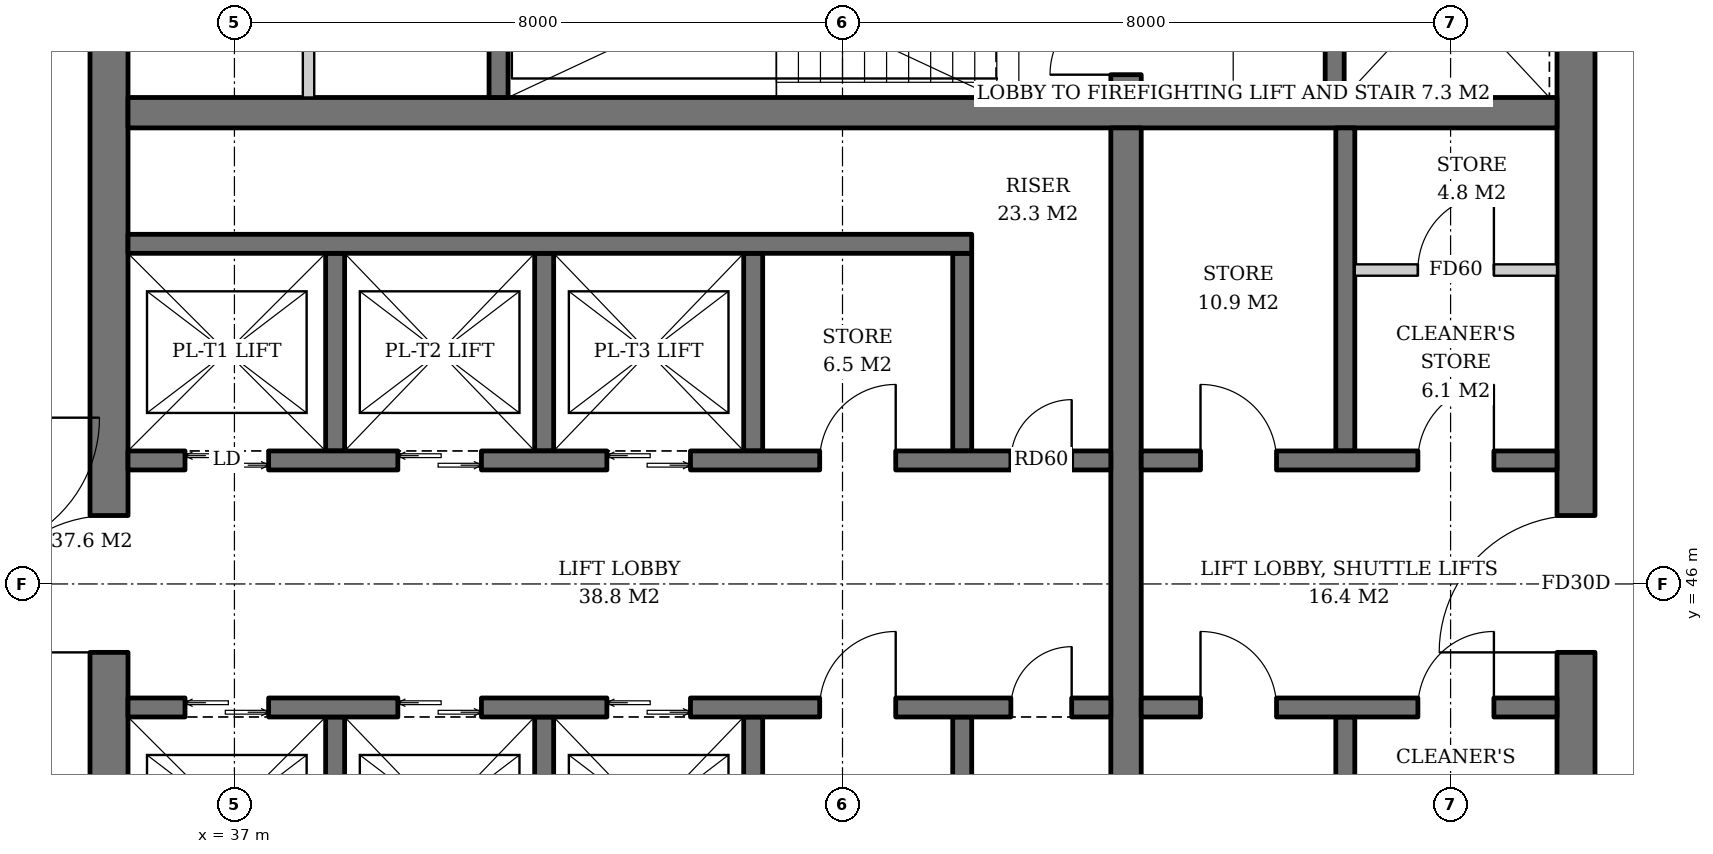
"""IFC4 building model, lengths in metres.
Left out: names, types, materials, properties, quantities, classifications, styles, units other than length and angle.
Written with IfcOpenShell. Run it as: python <this file> out.ifc"""

import sys

from ifc_helpers import new_model, si_unit, direction, frame, frame_2d, origin, place, context, subcontext, project, spatial, rectangle, extrude, element, fill, save


model = new_model("IFC4")
c1 = context("Model", 3, precision=1e-05, world=origin(), true_north=direction((0.0, 1.0)))
c2 = subcontext(c1, "Body", "Model", "MODEL_VIEW")
j1 = project(units=[si_unit("LENGTHUNIT", "METRE"), si_unit("PLANEANGLEUNIT", "RADIAN")], contexts=[c1])
p1 = place(None, origin())
s1 = spatial("IfcSite", under=j1, at=p1, CompositionType="ELEMENT")
p2 = place(p1, origin())
s2 = spatial("IfcBuilding", under=s1, at=p2, CompositionType="ELEMENT")
p3 = place(p2, frame((0.0, 0.0, 287.0)))
s3 = spatial("IfcBuildingStorey", under=s2, at=p3, CompositionType="ELEMENT", Elevation=287.0)
p4 = place(p3, frame((35.35, 36.6, 0.0), z_axis=(0.0, 0.0, 1.0), x_axis=(0.0, 1.0, 0.0)))
e1 = element("IfcWall", 1, at=p4, inside=s3, PredefinedType="SHEAR", context=c2, shape_type="SweptSolid", body=[
    extrude(rectangle(XDim=18.8, YDim=0.5, at=frame_2d((9.4, 0.0))), origin(), (0.0, 0.0, 1.0), 3.8),
])
p5 = place(p4, frame((8.5, 0.0, 0.0)))
e2 = element("IfcOpeningElement", 2, at=p5, cuts=e1, PredefinedType="OPENING", context=c2, shape_type="SweptSolid", body=[
    extrude(rectangle(XDim=1.8, YDim=2.4, at=frame_2d((0.9, 1.2))), frame((0.0, 0.26, 0.0), z_axis=(0.0, -1.0, 0.0), x_axis=(1.0, 0.0, 0.0)), (0.0, 0.0, 1.0), 0.52),
])
p6 = place(p3, frame((54.65, 36.6, 0.0), z_axis=(0.0, 0.0, 1.0), x_axis=(0.0, 1.0, 0.0)))
e3 = element("IfcWall", 3, at=p6, inside=s3, PredefinedType="SHEAR", context=c2, shape_type="SweptSolid", body=[
    extrude(rectangle(XDim=18.8, YDim=0.5, at=frame_2d((9.4, 0.0))), origin(), (0.0, 0.0, 1.0), 3.8),
])
p7 = place(p6, frame((8.5, 0.0, 0.0)))
e4 = element("IfcOpeningElement", 4, at=p7, cuts=e3, PredefinedType="OPENING", context=c2, shape_type="SweptSolid", body=[
    extrude(rectangle(XDim=1.8, YDim=2.4, at=frame_2d((0.9, 1.2))), frame((0.0, 0.26, 0.0), z_axis=(0.0, -1.0, 0.0), x_axis=(1.0, 0.0, 0.0)), (0.0, 0.0, 1.0), 0.52),
])
p8 = place(p3, frame((35.6, 52.2, 0.0), z_axis=(0.0, 0.0, 1.0), x_axis=(1.0, 0.0, 0.0)))
e5 = element("IfcWall", 5, at=p8, inside=s3, PredefinedType="SHEAR", context=c2, shape_type="SweptSolid", body=[
    extrude(rectangle(XDim=18.8, YDim=0.4, at=frame_2d((9.4, 0.0))), origin(), (0.0, 0.0, 1.0), 3.8),
])
p9 = place(p3, frame((48.73, 40.0, 0.0), z_axis=(0.0, 0.0, 1.0), x_axis=(0.0, 1.0, 0.0)))
e6 = element("IfcWall", 6, at=p9, inside=s3, PredefinedType="SHEAR", context=c2, shape_type="SweptSolid", body=[
    extrude(rectangle(XDim=12.0, YDim=0.4, at=frame_2d((6.0, 0.0))), origin(), (0.0, 0.0, 1.0), 3.8),
])
p10 = place(p3, frame((48.73, 52.4, 0.0), z_axis=(0.0, 0.0, 1.0), x_axis=(0.0, 1.0, 0.0)))
e7 = element("IfcWall", 7, at=p10, inside=s3, PredefinedType="SHEAR", context=c2, shape_type="SweptSolid", body=[
    extrude(rectangle(XDim=3.0, YDim=0.4, at=frame_2d((1.5, 0.0))), origin(), (0.0, 0.0, 1.0), 3.8),
])
p11 = place(p10, frame((0.3, 0.0, 0.0)))
e8 = element("IfcOpeningElement", 8, at=p11, cuts=e7, PredefinedType="OPENING", context=c2, shape_type="SweptSolid", body=[
    extrude(rectangle(XDim=1.0, YDim=2.1, at=frame_2d((0.5, 1.05))), frame((0.0, 0.21, 0.0), z_axis=(0.0, -1.0, 0.0), x_axis=(1.0, 0.0, 0.0)), (0.0, 0.0, 1.0), 0.42),
])
p12 = place(p3, frame((40.475, 52.4, 0.0), z_axis=(0.0, 0.0, 1.0), x_axis=(0.0, 1.0, 0.0)))
e9 = element("IfcWall", 9, at=p12, inside=s3, PredefinedType="SHEAR", context=c2, shape_type="SweptSolid", body=[
    extrude(rectangle(XDim=3.0, YDim=0.25, at=frame_2d((1.5, 0.0))), origin(), (0.0, 0.0, 1.0), 3.8),
])
p13 = place(p3, frame((51.475, 52.4, 0.0), z_axis=(0.0, 0.0, 1.0), x_axis=(0.0, 1.0, 0.0)))
e10 = element("IfcWall", 10, at=p13, inside=s3, PredefinedType="SHEAR", context=c2, shape_type="SweptSolid", body=[
    extrude(rectangle(XDim=3.0, YDim=0.25, at=frame_2d((1.5, 0.0))), origin(), (0.0, 0.0, 1.0), 3.8),
])
p14 = place(p13, frame((0.8, 0.0, 0.0)))
e11 = element("IfcOpeningElement", 11, at=p14, cuts=e10, PredefinedType="OPENING", context=c2, shape_type="SweptSolid", body=[
    extrude(rectangle(XDim=1.3, YDim=2.2, at=frame_2d((0.65, 1.1))), frame((0.0, 0.135, 0.0), z_axis=(0.0, -1.0, 0.0), x_axis=(1.0, 0.0, 0.0)), (0.0, 0.0, 1.0), 0.27),
])
for number, where, z_axis, x_axis in (
    (12, (38.325, 47.75, 0.0), (0.0, 0.0, 1.0), (0.0, 1.0, 0.0)),
    (13, (41.075, 47.75, 0.0), (0.0, 0.0, 1.0), (0.0, 1.0, 0.0)),
    (14, (43.825, 47.75, 0.0), (0.0, 0.0, 1.0), (0.0, 1.0, 0.0)),
    (15, (46.575, 47.75, 0.0), (0.0, 0.0, 1.0), (0.0, 1.0, 0.0)),
):
    element("IfcWall", number, at=place(p3, frame(where, z_axis=z_axis, x_axis=x_axis)), inside=s3, PredefinedType="SHEAR", context=c2, shape_type="SweptSolid", body=[
        extrude(rectangle(XDim=2.6, YDim=0.25, at=frame_2d((1.3, 0.0))), origin(), (0.0, 0.0, 1.0), 3.8),
    ])
p15 = place(p3, frame((35.6, 50.475, 0.0), z_axis=(0.0, 0.0, 1.0), x_axis=(1.0, 0.0, 0.0)))
e16 = element("IfcWall", 16, at=p15, inside=s3, PredefinedType="SHEAR", context=c2, shape_type="SweptSolid", body=[
    extrude(rectangle(XDim=11.1, YDim=0.25, at=frame_2d((5.55, 0.0))), origin(), (0.0, 0.0, 1.0), 3.8),
])
p16 = place(p3, frame((35.6, 47.625, 0.0), z_axis=(0.0, 0.0, 1.0), x_axis=(1.0, 0.0, 0.0)))
e17 = element("IfcWall", 17, at=p16, inside=s3, PredefinedType="SHEAR", context=c2, shape_type="SweptSolid", body=[
    extrude(rectangle(XDim=12.93, YDim=0.25, at=frame_2d((6.465, 0.0))), origin(), (0.0, 0.0, 1.0), 3.8),
])
p17 = place(p16, frame((0.75, 0.0, 0.0)))
e18 = element("IfcOpeningElement", 18, at=p17, cuts=e17, PredefinedType="OPENING", context=c2, shape_type="SweptSolid", body=[
    extrude(rectangle(XDim=1.1, YDim=2.2, at=frame_2d((0.55, 1.1))), frame((0.0, 0.135, 0.0), z_axis=(0.0, -1.0, 0.0), x_axis=(1.0, 0.0, 0.0)), (0.0, 0.0, 1.0), 0.27),
])
p18 = place(p16, frame((3.55, 0.0, 0.0)))
e19 = element("IfcOpeningElement", 19, at=p18, cuts=e17, PredefinedType="OPENING", context=c2, shape_type="SweptSolid", body=[
    extrude(rectangle(XDim=1.1, YDim=2.2, at=frame_2d((0.55, 1.1))), frame((0.0, 0.135, 0.0), z_axis=(0.0, -1.0, 0.0), x_axis=(1.0, 0.0, 0.0)), (0.0, 0.0, 1.0), 0.27),
])
p19 = place(p16, frame((6.3, 0.0, 0.0)))
e20 = element("IfcOpeningElement", 20, at=p19, cuts=e17, PredefinedType="OPENING", context=c2, shape_type="SweptSolid", body=[
    extrude(rectangle(XDim=1.1, YDim=2.2, at=frame_2d((0.55, 1.1))), frame((0.0, 0.135, 0.0), z_axis=(0.0, -1.0, 0.0), x_axis=(1.0, 0.0, 0.0)), (0.0, 0.0, 1.0), 0.27),
])
p20 = place(p16, frame((9.1, 0.0, 0.0)))
e21 = element("IfcOpeningElement", 21, at=p20, cuts=e17, PredefinedType="OPENING", context=c2, shape_type="SweptSolid", body=[
    extrude(rectangle(XDim=1.0, YDim=2.1, at=frame_2d((0.5, 1.05))), frame((0.0, 0.135, 0.0), z_axis=(0.0, -1.0, 0.0), x_axis=(1.0, 0.0, 0.0)), (0.0, 0.0, 1.0), 0.27),
])
p21 = place(p16, frame((11.615, 0.0, 0.0)))
e22 = element("IfcOpeningElement", 22, at=p21, cuts=e17, PredefinedType="OPENING", context=c2, shape_type="SweptSolid", body=[
    extrude(rectangle(XDim=0.8, YDim=2.0, at=frame_2d((0.4, 1.0))), frame((0.0, 0.135, 0.0), z_axis=(0.0, -1.0, 0.0), x_axis=(1.0, 0.0, 0.0)), (0.0, 0.0, 1.0), 0.27),
])
for number, where, z_axis, x_axis in (
    (23, (38.325, 44.25, 0.0), (0.0, 0.0, 1.0), (0.0, -1.0, 0.0)),
    (24, (41.075, 44.25, 0.0), (0.0, 0.0, 1.0), (0.0, -1.0, 0.0)),
    (25, (43.825, 44.25, 0.0), (0.0, 0.0, 1.0), (0.0, -1.0, 0.0)),
    (26, (46.575, 44.25, 0.0), (0.0, 0.0, 1.0), (0.0, -1.0, 0.0)),
):
    element("IfcWall", number, at=place(p3, frame(where, z_axis=z_axis, x_axis=x_axis)), inside=s3, PredefinedType="SHEAR", context=c2, shape_type="SweptSolid", body=[
        extrude(rectangle(XDim=2.6, YDim=0.25, at=frame_2d((1.3, 0.0))), origin(), (0.0, 0.0, 1.0), 3.8),
    ])
p22 = place(p3, frame((35.6, 44.375, 0.0), z_axis=(0.0, 0.0, 1.0), x_axis=(1.0, 0.0, 0.0)))
e27 = element("IfcWall", 27, at=p22, inside=s3, PredefinedType="SHEAR", context=c2, shape_type="SweptSolid", body=[
    extrude(rectangle(XDim=12.93, YDim=0.25, at=frame_2d((6.465, 0.0))), origin(), (0.0, 0.0, 1.0), 3.8),
])
p23 = place(p22, frame((0.75, 0.0, 0.0)))
e28 = element("IfcOpeningElement", 28, at=p23, cuts=e27, PredefinedType="OPENING", context=c2, shape_type="SweptSolid", body=[
    extrude(rectangle(XDim=1.1, YDim=2.2, at=frame_2d((0.55, 1.1))), frame((0.0, 0.135, 0.0), z_axis=(0.0, -1.0, 0.0), x_axis=(1.0, 0.0, 0.0)), (0.0, 0.0, 1.0), 0.27),
])
p24 = place(p22, frame((3.55, 0.0, 0.0)))
e29 = element("IfcOpeningElement", 29, at=p24, cuts=e27, PredefinedType="OPENING", context=c2, shape_type="SweptSolid", body=[
    extrude(rectangle(XDim=1.1, YDim=2.2, at=frame_2d((0.55, 1.1))), frame((0.0, 0.135, 0.0), z_axis=(0.0, -1.0, 0.0), x_axis=(1.0, 0.0, 0.0)), (0.0, 0.0, 1.0), 0.27),
])
p25 = place(p22, frame((6.3, 0.0, 0.0)))
e30 = element("IfcOpeningElement", 30, at=p25, cuts=e27, PredefinedType="OPENING", context=c2, shape_type="SweptSolid", body=[
    extrude(rectangle(XDim=1.1, YDim=2.2, at=frame_2d((0.55, 1.1))), frame((0.0, 0.135, 0.0), z_axis=(0.0, -1.0, 0.0), x_axis=(1.0, 0.0, 0.0)), (0.0, 0.0, 1.0), 0.27),
])
p26 = place(p22, frame((9.1, 0.0, 0.0)))
e31 = element("IfcOpeningElement", 31, at=p26, cuts=e27, PredefinedType="OPENING", context=c2, shape_type="SweptSolid", body=[
    extrude(rectangle(XDim=1.0, YDim=2.1, at=frame_2d((0.5, 1.05))), frame((0.0, 0.135, 0.0), z_axis=(0.0, -1.0, 0.0), x_axis=(1.0, 0.0, 0.0)), (0.0, 0.0, 1.0), 0.27),
])
p27 = place(p22, frame((11.615, 0.0, 0.0)))
e32 = element("IfcOpeningElement", 32, at=p27, cuts=e27, PredefinedType="OPENING", context=c2, shape_type="SweptSolid", body=[
    extrude(rectangle(XDim=0.8, YDim=2.0, at=frame_2d((0.4, 1.0))), frame((0.0, 0.135, 0.0), z_axis=(0.0, -1.0, 0.0), x_axis=(1.0, 0.0, 0.0)), (0.0, 0.0, 1.0), 0.27),
])
p28 = place(p3, frame((51.615, 47.75, 0.0), z_axis=(0.0, 0.0, 1.0), x_axis=(0.0, 1.0, 0.0)))
e33 = element("IfcWall", 33, at=p28, inside=s3, PredefinedType="SHEAR", context=c2, shape_type="SweptSolid", body=[
    extrude(rectangle(XDim=4.25, YDim=0.25, at=frame_2d((2.125, 0.0))), origin(), (0.0, 0.0, 1.0), 3.8),
])
p29 = place(p3, frame((48.93, 47.625, 0.0), z_axis=(0.0, 0.0, 1.0), x_axis=(1.0, 0.0, 0.0)))
e34 = element("IfcWall", 34, at=p29, inside=s3, PredefinedType="SHEAR", context=c2, shape_type="SweptSolid", body=[
    extrude(rectangle(XDim=5.47, YDim=0.25, at=frame_2d((2.735, 0.0))), origin(), (0.0, 0.0, 1.0), 3.8),
])
p30 = place(p29, frame((0.78, 0.0, 0.0)))
e35 = element("IfcOpeningElement", 35, at=p30, cuts=e34, PredefinedType="OPENING", context=c2, shape_type="SweptSolid", body=[
    extrude(rectangle(XDim=1.0, YDim=2.1, at=frame_2d((0.5, 1.05))), frame((0.0, 0.135, 0.0), z_axis=(0.0, -1.0, 0.0), x_axis=(1.0, 0.0, 0.0)), (0.0, 0.0, 1.0), 0.27),
])
p31 = place(p29, frame((3.64, 0.0, 0.0)))
e36 = element("IfcOpeningElement", 36, at=p31, cuts=e34, PredefinedType="OPENING", context=c2, shape_type="SweptSolid", body=[
    extrude(rectangle(XDim=1.0, YDim=2.1, at=frame_2d((0.5, 1.05))), frame((0.0, 0.135, 0.0), z_axis=(0.0, -1.0, 0.0), x_axis=(1.0, 0.0, 0.0)), (0.0, 0.0, 1.0), 0.27),
])
p32 = place(p3, frame((51.615, 44.25, 0.0), z_axis=(0.0, 0.0, 1.0), x_axis=(0.0, -1.0, 0.0)))
e37 = element("IfcWall", 37, at=p32, inside=s3, PredefinedType="SHEAR", context=c2, shape_type="SweptSolid", body=[
    extrude(rectangle(XDim=4.25, YDim=0.25, at=frame_2d((2.125, 0.0))), origin(), (0.0, 0.0, 1.0), 3.8),
])
p33 = place(p3, frame((48.93, 44.375, 0.0), z_axis=(0.0, 0.0, 1.0), x_axis=(1.0, 0.0, 0.0)))
e38 = element("IfcWall", 38, at=p33, inside=s3, PredefinedType="SHEAR", context=c2, shape_type="SweptSolid", body=[
    extrude(rectangle(XDim=5.47, YDim=0.25, at=frame_2d((2.735, 0.0))), origin(), (0.0, 0.0, 1.0), 3.8),
])
p34 = place(p33, frame((0.78, 0.0, 0.0)))
e39 = element("IfcOpeningElement", 39, at=p34, cuts=e38, PredefinedType="OPENING", context=c2, shape_type="SweptSolid", body=[
    extrude(rectangle(XDim=1.0, YDim=2.1, at=frame_2d((0.5, 1.05))), frame((0.0, 0.135, 0.0), z_axis=(0.0, -1.0, 0.0), x_axis=(1.0, 0.0, 0.0)), (0.0, 0.0, 1.0), 0.27),
])
p35 = place(p33, frame((3.64, 0.0, 0.0)))
e40 = element("IfcOpeningElement", 40, at=p35, cuts=e38, PredefinedType="OPENING", context=c2, shape_type="SweptSolid", body=[
    extrude(rectangle(XDim=1.0, YDim=2.1, at=frame_2d((0.5, 1.05))), frame((0.0, 0.135, 0.0), z_axis=(0.0, -1.0, 0.0), x_axis=(1.0, 0.0, 0.0)), (0.0, 0.0, 1.0), 0.27),
])
p36 = place(p3, frame((37.975, 52.4, 0.0), z_axis=(0.0, 0.0, 1.0), x_axis=(0.0, 1.0, 0.0)))
e41 = element("IfcWall", 41, at=p36, inside=s3, PredefinedType="SOLIDWALL", context=c2, shape_type="SweptSolid", body=[
    extrude(rectangle(XDim=3.0, YDim=0.15, at=frame_2d((1.5, 0.0))), origin(), (0.0, 0.0, 1.0), 3.55),
])
p37 = place(p3, frame((51.74, 50.13, 0.0), z_axis=(0.0, 0.0, 1.0), x_axis=(1.0, 0.0, 0.0)))
e42 = element("IfcWall", 42, at=p37, inside=s3, PredefinedType="SOLIDWALL", context=c2, shape_type="SweptSolid", body=[
    extrude(rectangle(XDim=2.66, YDim=0.15, at=frame_2d((1.33, 0.0))), origin(), (0.0, 0.0, 1.0), 3.55),
])
p38 = place(p37, frame((0.83, 0.0, 0.0)))
e43 = element("IfcOpeningElement", 43, at=p38, cuts=e42, PredefinedType="OPENING", context=c2, shape_type="SweptSolid", body=[
    extrude(rectangle(XDim=1.0, YDim=2.1, at=frame_2d((0.5, 1.05))), frame((0.0, 0.085, 0.0), z_axis=(0.0, -1.0, 0.0), x_axis=(1.0, 0.0, 0.0)), (0.0, 0.0, 1.0), 0.17),
])
p39 = place(p17, origin())
e44 = element("IfcDoor", 44, at=p39, inside=s3, OperationType="DOUBLE_DOOR_SLIDING", PredefinedType="DOOR", context=c2, shape_type="SweptSolid", body=[
    extrude(rectangle(XDim=1.1, YDim=2.2, at=frame_2d((0.55, 1.1))), frame((0.0, 0.025, 0.0), z_axis=(0.0, -1.0, 0.0), x_axis=(1.0, 0.0, 0.0)), (0.0, 0.0, 1.0), 0.05),
])
fill(e18, e44)
p40 = place(p18, origin())
e45 = element("IfcDoor", 45, at=p40, inside=s3, OperationType="DOUBLE_DOOR_SLIDING", PredefinedType="DOOR", context=c2, shape_type="SweptSolid", body=[
    extrude(rectangle(XDim=1.1, YDim=2.2, at=frame_2d((0.55, 1.1))), frame((0.0, 0.025, 0.0), z_axis=(0.0, -1.0, 0.0), x_axis=(1.0, 0.0, 0.0)), (0.0, 0.0, 1.0), 0.05),
])
fill(e19, e45)
p41 = place(p19, origin())
e46 = element("IfcDoor", 46, at=p41, inside=s3, OperationType="DOUBLE_DOOR_SLIDING", PredefinedType="DOOR", context=c2, shape_type="SweptSolid", body=[
    extrude(rectangle(XDim=1.1, YDim=2.2, at=frame_2d((0.55, 1.1))), frame((0.0, 0.025, 0.0), z_axis=(0.0, -1.0, 0.0), x_axis=(1.0, 0.0, 0.0)), (0.0, 0.0, 1.0), 0.05),
])
fill(e20, e46)
p42 = place(p20, origin())
e47 = element("IfcDoor", 47, at=p42, inside=s3, OperationType="SINGLE_SWING_RIGHT", PredefinedType="DOOR", context=c2, shape_type="SweptSolid", body=[
    extrude(rectangle(XDim=1.0, YDim=2.1, at=frame_2d((0.5, 1.05))), frame((0.0, 0.025, 0.0), z_axis=(0.0, -1.0, 0.0), x_axis=(1.0, 0.0, 0.0)), (0.0, 0.0, 1.0), 0.05),
])
fill(e21, e47)
p43 = place(p21, origin())
e48 = element("IfcDoor", 48, at=p43, inside=s3, OperationType="SINGLE_SWING_RIGHT", PredefinedType="DOOR", context=c2, shape_type="SweptSolid", body=[
    extrude(rectangle(XDim=0.8, YDim=2.0, at=frame_2d((0.4, 1.0))), frame((0.0, 0.025, 0.0), z_axis=(0.0, -1.0, 0.0), x_axis=(1.0, 0.0, 0.0)), (0.0, 0.0, 1.0), 0.05),
])
fill(e22, e48)
p44 = place(p23, origin())
e49 = element("IfcDoor", 49, at=p44, inside=s3, OperationType="DOUBLE_DOOR_SLIDING", PredefinedType="DOOR", context=c2, shape_type="SweptSolid", body=[
    extrude(rectangle(XDim=1.1, YDim=2.2, at=frame_2d((0.55, 1.1))), frame((0.0, 0.025, 0.0), z_axis=(0.0, -1.0, 0.0), x_axis=(1.0, 0.0, 0.0)), (0.0, 0.0, 1.0), 0.05),
])
fill(e28, e49)
p45 = place(p24, origin())
e50 = element("IfcDoor", 50, at=p45, inside=s3, OperationType="DOUBLE_DOOR_SLIDING", PredefinedType="DOOR", context=c2, shape_type="SweptSolid", body=[
    extrude(rectangle(XDim=1.1, YDim=2.2, at=frame_2d((0.55, 1.1))), frame((0.0, 0.025, 0.0), z_axis=(0.0, -1.0, 0.0), x_axis=(1.0, 0.0, 0.0)), (0.0, 0.0, 1.0), 0.05),
])
fill(e29, e50)
p46 = place(p25, origin())
e51 = element("IfcDoor", 51, at=p46, inside=s3, OperationType="DOUBLE_DOOR_SLIDING", PredefinedType="DOOR", context=c2, shape_type="SweptSolid", body=[
    extrude(rectangle(XDim=1.1, YDim=2.2, at=frame_2d((0.55, 1.1))), frame((0.0, 0.025, 0.0), z_axis=(0.0, -1.0, 0.0), x_axis=(1.0, 0.0, 0.0)), (0.0, 0.0, 1.0), 0.05),
])
fill(e30, e51)
p47 = place(p26, origin())
e52 = element("IfcDoor", 52, at=p47, inside=s3, OperationType="SINGLE_SWING_RIGHT", PredefinedType="DOOR", context=c2, shape_type="SweptSolid", body=[
    extrude(rectangle(XDim=1.0, YDim=2.1, at=frame_2d((0.5, 1.05))), frame((0.0, 0.025, 0.0), z_axis=(0.0, -1.0, 0.0), x_axis=(1.0, 0.0, 0.0)), (0.0, 0.0, 1.0), 0.05),
])
fill(e31, e52)
p48 = place(p27, origin())
e53 = element("IfcDoor", 53, at=p48, inside=s3, OperationType="SINGLE_SWING_RIGHT", PredefinedType="DOOR", context=c2, shape_type="SweptSolid", body=[
    extrude(rectangle(XDim=0.8, YDim=2.0, at=frame_2d((0.4, 1.0))), frame((0.0, 0.025, 0.0), z_axis=(0.0, -1.0, 0.0), x_axis=(1.0, 0.0, 0.0)), (0.0, 0.0, 1.0), 0.05),
])
fill(e32, e53)
p49 = place(p30, origin())
e54 = element("IfcDoor", 54, at=p49, inside=s3, OperationType="SINGLE_SWING_LEFT", PredefinedType="DOOR", context=c2, shape_type="SweptSolid", body=[
    extrude(rectangle(XDim=1.0, YDim=2.1, at=frame_2d((0.5, 1.05))), frame((0.0, 0.025, 0.0), z_axis=(0.0, -1.0, 0.0), x_axis=(1.0, 0.0, 0.0)), (0.0, 0.0, 1.0), 0.05),
])
fill(e35, e54)
p50 = place(p31, origin())
e55 = element("IfcDoor", 55, at=p50, inside=s3, OperationType="SINGLE_SWING_RIGHT", PredefinedType="DOOR", context=c2, shape_type="SweptSolid", body=[
    extrude(rectangle(XDim=1.0, YDim=2.1, at=frame_2d((0.5, 1.05))), frame((0.0, 0.025, 0.0), z_axis=(0.0, -1.0, 0.0), x_axis=(1.0, 0.0, 0.0)), (0.0, 0.0, 1.0), 0.05),
])
fill(e36, e55)
p51 = place(p34, origin())
e56 = element("IfcDoor", 56, at=p51, inside=s3, OperationType="SINGLE_SWING_LEFT", PredefinedType="DOOR", context=c2, shape_type="SweptSolid", body=[
    extrude(rectangle(XDim=1.0, YDim=2.1, at=frame_2d((0.5, 1.05))), frame((0.0, 0.025, 0.0), z_axis=(0.0, -1.0, 0.0), x_axis=(1.0, 0.0, 0.0)), (0.0, 0.0, 1.0), 0.05),
])
fill(e39, e56)
p52 = place(p35, origin())
e57 = element("IfcDoor", 57, at=p52, inside=s3, OperationType="SINGLE_SWING_RIGHT", PredefinedType="DOOR", context=c2, shape_type="SweptSolid", body=[
    extrude(rectangle(XDim=1.0, YDim=2.1, at=frame_2d((0.5, 1.05))), frame((0.0, 0.025, 0.0), z_axis=(0.0, -1.0, 0.0), x_axis=(1.0, 0.0, 0.0)), (0.0, 0.0, 1.0), 0.05),
])
fill(e40, e57)
p53 = place(p38, origin())
e58 = element("IfcDoor", 58, at=p53, inside=s3, OperationType="SINGLE_SWING_RIGHT", PredefinedType="DOOR", context=c2, shape_type="SweptSolid", body=[
    extrude(rectangle(XDim=1.0, YDim=2.1, at=frame_2d((0.5, 1.05))), frame((0.0, 0.025, 0.0), z_axis=(0.0, -1.0, 0.0), x_axis=(1.0, 0.0, 0.0)), (0.0, 0.0, 1.0), 0.05),
])
fill(e43, e58)
p54 = place(p11, origin())
e59 = element("IfcDoor", 59, at=p54, inside=s3, OperationType="SINGLE_SWING_LEFT", PredefinedType="DOOR", context=c2, shape_type="SweptSolid", body=[
    extrude(rectangle(XDim=1.0, YDim=2.1, at=frame_2d((0.5, 1.05))), frame((0.0, 0.025, 0.0), z_axis=(0.0, -1.0, 0.0), x_axis=(1.0, 0.0, 0.0)), (0.0, 0.0, 1.0), 0.05),
])
fill(e8, e59)
p55 = place(p5, origin())
e60 = element("IfcDoor", 60, at=p55, inside=s3, OperationType="DOUBLE_DOOR_SINGLE_SWING", PredefinedType="DOOR", context=c2, shape_type="SweptSolid", body=[
    extrude(rectangle(XDim=1.8, YDim=2.4, at=frame_2d((0.9, 1.2))), frame((0.0, 0.025, 0.0), z_axis=(0.0, -1.0, 0.0), x_axis=(1.0, 0.0, 0.0)), (0.0, 0.0, 1.0), 0.05),
])
fill(e2, e60)
p56 = place(p7, origin())
e61 = element("IfcDoor", 61, at=p56, inside=s3, OperationType="DOUBLE_DOOR_SINGLE_SWING", PredefinedType="DOOR", context=c2, shape_type="SweptSolid", body=[
    extrude(rectangle(XDim=1.8, YDim=2.4, at=frame_2d((0.9, 1.2))), frame((0.0, 0.025, 0.0), z_axis=(0.0, -1.0, 0.0), x_axis=(1.0, 0.0, 0.0)), (0.0, 0.0, 1.0), 0.05),
])
fill(e4, e61)
save(model, sys.argv[1])
